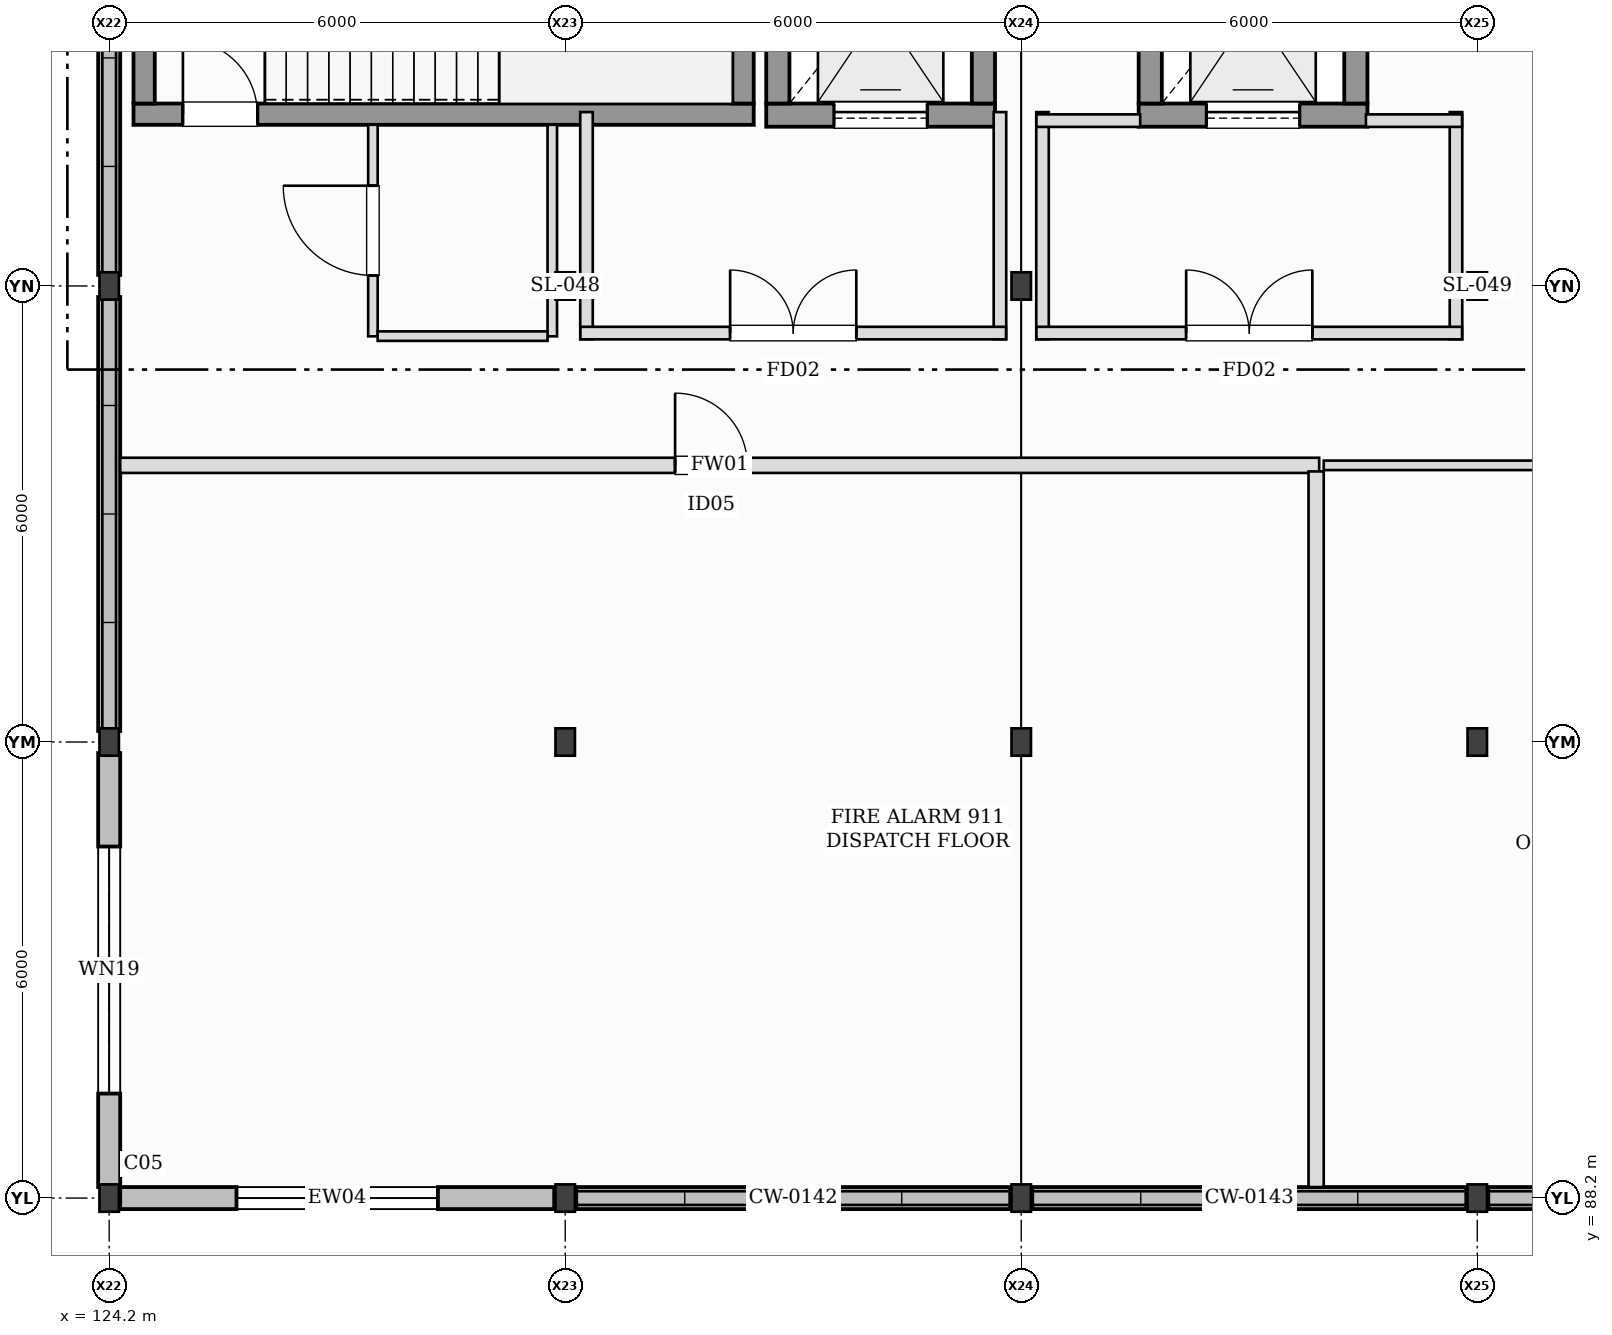
"""IFC4 building model, lengths in metres.
Left out: names, types, materials, properties, quantities, classifications, styles, units other than length and angle.
Written with IfcOpenShell. Run it as: python <this file> out.ifc"""

import sys

from ifc_helpers import new_model, si_unit, direction, frame, frame_2d, origin, origin_2d, place, context, subcontext, project, spatial, rectangle, i_section, extrude, element, fill, save


model = new_model("IFC4")
c1 = context("Model", 3, precision=1e-05, world=origin(), true_north=direction((0.0, 1.0)))
c2 = subcontext(c1, "Body", "Model", "MODEL_VIEW")
j1 = project(units=[si_unit("LENGTHUNIT", "METRE"), si_unit("PLANEANGLEUNIT", "RADIAN")], contexts=[c1])
p1 = place(None, origin())
s1 = spatial("IfcSite", under=j1, at=p1, CompositionType="ELEMENT")
p2 = place(p1, origin())
s2 = spatial("IfcBuilding", under=s1, at=p2, CompositionType="ELEMENT")
p3 = place(p2, frame((0.0, 0.0, 14.0)))
s3 = spatial("IfcBuildingStorey", under=s2, at=p3, CompositionType="ELEMENT", Elevation=14.0)
for number, where, z_axis, x_axis in (
    (1, (124.2, 88.2, 0.0), (0.0, 0.0, 1.0), (1.0, 0.0, 0.0)),
    (2, (124.2, 94.2, 0.0), (0.0, 0.0, 1.0), (1.0, 0.0, 0.0)),
    (3, (124.2, 100.2, 0.0), (0.0, 0.0, 1.0), (1.0, 0.0, 0.0)),
    (4, (130.2, 88.2, 0.0), (0.0, 0.0, 1.0), (1.0, 0.0, 0.0)),
    (5, (130.2, 94.2, 0.0), (0.0, 0.0, 1.0), (1.0, 0.0, 0.0)),
    (6, (130.2, 100.2, 0.0), (0.0, 0.0, 1.0), (1.0, 0.0, 0.0)),
    (7, (136.2, 88.2, 0.0), (0.0, 0.0, 1.0), (1.0, 0.0, 0.0)),
    (8, (136.2, 94.2, 0.0), (0.0, 0.0, 1.0), (1.0, 0.0, 0.0)),
    (9, (136.2, 100.2, 0.0), (0.0, 0.0, 1.0), (1.0, 0.0, 0.0)),
    (10, (142.2, 88.2, 0.0), (0.0, 0.0, 1.0), (1.0, 0.0, 0.0)),
    (11, (142.2, 94.2, 0.0), (0.0, 0.0, 1.0), (1.0, 0.0, 0.0)),
    (12, (142.2, 100.2, 0.0), (0.0, 0.0, 1.0), (1.0, 0.0, 0.0)),
):
    element("IfcColumn", number, at=place(p3, frame(where, z_axis=z_axis, x_axis=x_axis)), inside=s3, PredefinedType="COLUMN", context=c2, shape_type="SweptSolid", body=[
        extrude(i_section(OverallWidth=0.256, OverallDepth=0.36, WebThickness=0.011, FlangeThickness=0.02, at=origin_2d()), origin(), (0.0, 0.0, 1.0), 4.0),
    ])
p4 = place(p3, frame((124.345, 88.2, 0.0), z_axis=(0.0, 0.0, 1.0), x_axis=(1.0, 0.0, 0.0)))
e13 = element("IfcWall", 13, at=p4, inside=s3, PredefinedType="STANDARD", context=c2, shape_type="SweptSolid", body=[
    extrude(rectangle(XDim=5.71, YDim=0.29, at=frame_2d((2.855, 0.0))), origin(), (0.0, 0.0, 1.0), 3.299),
])
p5 = place(p4, frame((1.53, 0.0, 1.0)))
e14 = element("IfcOpeningElement", 14, at=p5, cuts=e13, PredefinedType="OPENING", context=c2, shape_type="SweptSolid", body=[
    extrude(rectangle(XDim=2.65, YDim=1.55, at=frame_2d((1.325, 0.775))), frame((0.0, 0.155, 0.0), z_axis=(0.0, -1.0, 0.0), x_axis=(1.0, 0.0, 0.0)), (0.0, 0.0, 1.0), 0.31),
])
p6 = place(p3, frame((130.345, 88.2, 0.0), z_axis=(0.0, 0.0, 1.0), x_axis=(1.0, 0.0, 0.0)))
e15 = element("IfcWall", 15, at=p6, inside=s3, PredefinedType="STANDARD", context=c2, shape_type="SweptSolid", body=[
    extrude(rectangle(XDim=5.71, YDim=0.29, at=frame_2d((2.855, 0.0))), origin(), (0.0, 0.0, 1.0), 0.56),
])
p7 = place(p3, frame((136.345, 88.2, 0.0), z_axis=(0.0, 0.0, 1.0), x_axis=(1.0, 0.0, 0.0)))
e16 = element("IfcWall", 16, at=p7, inside=s3, PredefinedType="STANDARD", context=c2, shape_type="SweptSolid", body=[
    extrude(rectangle(XDim=5.71, YDim=0.29, at=frame_2d((2.855, 0.0))), origin(), (0.0, 0.0, 1.0), 0.68),
])
p8 = place(p3, frame((142.345, 88.2, 0.0), z_axis=(0.0, 0.0, 1.0), x_axis=(1.0, 0.0, 0.0)))
e17 = element("IfcWall", 17, at=p8, inside=s3, PredefinedType="STANDARD", context=c2, shape_type="SweptSolid", body=[
    extrude(rectangle(XDim=5.71, YDim=0.29, at=frame_2d((2.855, 0.0))), origin(), (0.0, 0.0, 1.0), 0.8),
])
p9 = place(p3, frame((124.2, 94.055, 0.0), z_axis=(0.0, 0.0, 1.0), x_axis=(0.0, -1.0, 0.0)))
e18 = element("IfcWall", 18, at=p9, inside=s3, PredefinedType="STANDARD", context=c2, shape_type="SweptSolid", body=[
    extrude(rectangle(XDim=5.71, YDim=0.29, at=frame_2d((2.855, 0.0))), origin(), (0.0, 0.0, 1.0), 3.303),
])
p10 = place(p9, frame((1.23, 0.0, 1.0)))
e19 = element("IfcOpeningElement", 19, at=p10, cuts=e18, PredefinedType="OPENING", context=c2, shape_type="SweptSolid", body=[
    extrude(rectangle(XDim=3.25, YDim=1.55, at=frame_2d((1.625, 0.775))), frame((0.0, 0.155, 0.0), z_axis=(0.0, -1.0, 0.0), x_axis=(1.0, 0.0, 0.0)), (0.0, 0.0, 1.0), 0.31),
])
p11 = place(p3, frame((124.2, 100.055, 0.0), z_axis=(0.0, 0.0, 1.0), x_axis=(0.0, -1.0, 0.0)))
e20 = element("IfcWall", 20, at=p11, inside=s3, PredefinedType="STANDARD", context=c2, shape_type="SweptSolid", body=[
    extrude(rectangle(XDim=5.71, YDim=0.29, at=frame_2d((2.855, 0.0))), origin(), (0.0, 0.0, 1.0), 0.8),
])
p12 = place(p3, frame((124.2, 106.055, 0.0), z_axis=(0.0, 0.0, 1.0), x_axis=(0.0, -1.0, 0.0)))
e21 = element("IfcWall", 21, at=p12, inside=s3, PredefinedType="STANDARD", context=c2, shape_type="SweptSolid", body=[
    extrude(rectangle(XDim=5.71, YDim=0.29, at=frame_2d((2.855, 0.0))), origin(), (0.0, 0.0, 1.0), 0.92),
])
p13 = place(p3, frame((124.52, 102.46, 0.0), z_axis=(0.0, 0.0, 1.0), x_axis=(1.0, 0.0, 0.0)))
e22 = element("IfcWall", 22, at=p13, inside=s3, PredefinedType="SHEAR", context=c2, shape_type="SweptSolid", body=[
    extrude(rectangle(XDim=8.16, YDim=0.28, at=frame_2d((4.08, 0.0))), origin(), (0.0, 0.0, 1.0), 4.0),
])
p14 = place(p13, frame((0.65, 0.0, 0.0)))
e23 = element("IfcOpeningElement", 23, at=p14, cuts=e22, PredefinedType="OPENING", context=c2, shape_type="SweptSolid", body=[
    extrude(rectangle(XDim=0.98, YDim=2.15, at=frame_2d((0.49, 1.075))), frame((0.0, 0.15, 0.0), z_axis=(0.0, -1.0, 0.0), x_axis=(1.0, 0.0, 0.0)), (0.0, 0.0, 1.0), 0.3),
])
for number, where, z_axis, x_axis in (
    (24, (124.66, 105.6, 0.0), (0.0, 0.0, 1.0), (0.0, -1.0, 0.0)),
    (25, (132.54, 102.6, 0.0), (0.0, 0.0, 1.0), (0.0, 1.0, 0.0)),
):
    element("IfcWall", number, at=place(p3, frame(where, z_axis=z_axis, x_axis=x_axis)), inside=s3, PredefinedType="SHEAR", context=c2, shape_type="SweptSolid", body=[
        extrude(rectangle(XDim=3.0, YDim=0.28, at=frame_2d((1.5, 0.0))), origin(), (0.0, 0.0, 1.0), 4.0),
    ])
p15 = place(p3, frame((132.845, 102.448, 0.0), z_axis=(0.0, 0.0, 1.0), x_axis=(1.0, 0.0, 0.0)))
e26 = element("IfcWall", 26, at=p15, inside=s3, PredefinedType="SHEAR", context=c2, shape_type="SweptSolid", body=[
    extrude(rectangle(XDim=3.01, YDim=0.305, at=frame_2d((1.505, 0.0))), origin(), (0.0, 0.0, 1.0), 4.0),
])
p16 = place(p15, frame((0.895, 0.0, 0.0)))
e27 = element("IfcOpeningElement", 27, at=p16, cuts=e26, PredefinedType="OPENING", context=c2, shape_type="SweptSolid", body=[
    extrude(rectangle(XDim=1.22, YDim=2.22, at=frame_2d((0.61, 1.11))), frame((0.0, 0.162, 0.0), z_axis=(0.0, -1.0, 0.0), x_axis=(1.0, 0.0, 0.0)), (0.0, 0.0, 1.0), 0.325),
])
for number, where, z_axis, x_axis in (
    (28, (132.998, 105.6, 0.0), (0.0, 0.0, 1.0), (0.0, -1.0, 0.0)),
    (29, (135.702, 102.6, 0.0), (0.0, 0.0, 1.0), (0.0, 1.0, 0.0)),
):
    element("IfcWall", number, at=place(p3, frame(where, z_axis=z_axis, x_axis=x_axis)), inside=s3, PredefinedType="SHEAR", context=c2, shape_type="SweptSolid", body=[
        extrude(rectangle(XDim=3.0, YDim=0.305, at=frame_2d((1.5, 0.0))), origin(), (0.0, 0.0, 1.0), 4.0),
    ])
for number, where, z_axis, x_axis in (
    (30, (130.48, 99.5, 0.0), (0.0, 0.0, 1.0), (0.0, 1.0, 0.0)),
    (31, (135.92, 102.488, 0.0), (0.0, 0.0, 1.0), (0.0, -1.0, 0.0)),
):
    element("IfcWall", number, at=place(p3, frame(where, z_axis=z_axis, x_axis=x_axis)), inside=s3, PredefinedType="PARTITIONING", context=c2, shape_type="SweptSolid", body=[
        extrude(rectangle(XDim=2.988, YDim=0.165, at=frame_2d((1.494, 0.0))), origin(), (0.0, 0.0, 1.0), 3.273),
    ])
p17 = place(p3, frame((130.4, 99.58, 0.0), z_axis=(0.0, 0.0, 1.0), x_axis=(1.0, 0.0, 0.0)))
e32 = element("IfcWall", 32, at=p17, inside=s3, PredefinedType="PARTITIONING", context=c2, shape_type="SweptSolid", body=[
    extrude(rectangle(XDim=5.6, YDim=0.165, at=frame_2d((2.8, 0.0))), origin(), (0.0, 0.0, 1.0), 3.76),
])
p18 = place(p17, frame((1.97, 0.0, 0.0)))
e33 = element("IfcOpeningElement", 33, at=p18, cuts=e32, PredefinedType="OPENING", context=c2, shape_type="SweptSolid", body=[
    extrude(rectangle(XDim=1.66, YDim=2.2, at=frame_2d((0.83, 1.1))), frame((0.0, 0.093, 0.0), z_axis=(0.0, -1.0, 0.0), x_axis=(1.0, 0.0, 0.0)), (0.0, 0.0, 1.0), 0.185),
])
p19 = place(p3, frame((137.745, 102.448, 0.0), z_axis=(0.0, 0.0, 1.0), x_axis=(1.0, 0.0, 0.0)))
e34 = element("IfcWall", 34, at=p19, inside=s3, PredefinedType="SHEAR", context=c2, shape_type="SweptSolid", body=[
    extrude(rectangle(XDim=3.01, YDim=0.305, at=frame_2d((1.505, 0.0))), origin(), (0.0, 0.0, 1.0), 4.0),
])
p20 = place(p19, frame((0.895, 0.0, 0.0)))
e35 = element("IfcOpeningElement", 35, at=p20, cuts=e34, PredefinedType="OPENING", context=c2, shape_type="SweptSolid", body=[
    extrude(rectangle(XDim=1.22, YDim=2.22, at=frame_2d((0.61, 1.11))), frame((0.0, 0.162, 0.0), z_axis=(0.0, -1.0, 0.0), x_axis=(1.0, 0.0, 0.0)), (0.0, 0.0, 1.0), 0.325),
])
for number, where, z_axis, x_axis in (
    (36, (137.897, 105.6, 0.0), (0.0, 0.0, 1.0), (0.0, -1.0, 0.0)),
    (37, (140.603, 102.6, 0.0), (0.0, 0.0, 1.0), (0.0, 1.0, 0.0)),
):
    element("IfcWall", number, at=place(p3, frame(where, z_axis=z_axis, x_axis=x_axis)), inside=s3, PredefinedType="SHEAR", context=c2, shape_type="SweptSolid", body=[
        extrude(rectangle(XDim=3.0, YDim=0.305, at=frame_2d((1.5, 0.0))), origin(), (0.0, 0.0, 1.0), 4.0),
    ])
for number, where, z_axis, x_axis in (
    (38, (136.48, 99.5, 0.0), (0.0, 0.0, 1.0), (0.0, 1.0, 0.0)),
    (39, (141.92, 102.488, 0.0), (0.0, 0.0, 1.0), (0.0, -1.0, 0.0)),
):
    element("IfcWall", number, at=place(p3, frame(where, z_axis=z_axis, x_axis=x_axis)), inside=s3, PredefinedType="PARTITIONING", context=c2, shape_type="SweptSolid", body=[
        extrude(rectangle(XDim=2.988, YDim=0.165, at=frame_2d((1.494, 0.0))), origin(), (0.0, 0.0, 1.0), 3.273),
    ])
p21 = place(p3, frame((136.4, 102.375, 0.0), z_axis=(0.0, 0.0, 1.0), x_axis=(1.0, 0.0, 0.0)))
e40 = element("IfcWall", 40, at=p21, inside=s3, PredefinedType="PARTITIONING", context=c2, shape_type="SweptSolid", body=[
    extrude(rectangle(XDim=1.365, YDim=0.165, at=frame_2d((0.683, 0.0))), origin(), (0.0, 0.0, 1.0), 3.76),
])
p22 = place(p3, frame((140.735, 102.375, 0.0), z_axis=(0.0, 0.0, 1.0), x_axis=(1.0, 0.0, 0.0)))
e41 = element("IfcWall", 41, at=p22, inside=s3, PredefinedType="PARTITIONING", context=c2, shape_type="SweptSolid", body=[
    extrude(rectangle(XDim=1.265, YDim=0.165, at=frame_2d((0.632, 0.0))), origin(), (0.0, 0.0, 1.0), 3.76),
])
p23 = place(p3, frame((136.4, 99.58, 0.0), z_axis=(0.0, 0.0, 1.0), x_axis=(1.0, 0.0, 0.0)))
e42 = element("IfcWall", 42, at=p23, inside=s3, PredefinedType="PARTITIONING", context=c2, shape_type="SweptSolid", body=[
    extrude(rectangle(XDim=5.6, YDim=0.165, at=frame_2d((2.8, 0.0))), origin(), (0.0, 0.0, 1.0), 3.76),
])
p24 = place(p23, frame((1.97, 0.0, 0.0)))
e43 = element("IfcOpeningElement", 43, at=p24, cuts=e42, PredefinedType="OPENING", context=c2, shape_type="SweptSolid", body=[
    extrude(rectangle(XDim=1.66, YDim=2.2, at=frame_2d((0.83, 1.1))), frame((0.0, 0.093, 0.0), z_axis=(0.0, -1.0, 0.0), x_axis=(1.0, 0.0, 0.0)), (0.0, 0.0, 1.0), 0.185),
])
p25 = place(p3, frame((124.345, 97.84, 0.0), z_axis=(0.0, 0.0, 1.0), x_axis=(1.0, 0.0, 0.0)))
e44 = element("IfcWall", 44, at=p25, inside=s3, PredefinedType="PARTITIONING", context=c2, shape_type="SweptSolid", body=[
    extrude(rectangle(XDim=15.775, YDim=0.2, at=frame_2d((7.888, 0.0))), origin(), (0.0, 0.0, 1.0), 3.76),
])
p26 = place(p25, frame((7.301, 0.0, 0.0)))
e45 = element("IfcOpeningElement", 45, at=p26, cuts=e44, PredefinedType="OPENING", context=c2, shape_type="SweptSolid", body=[
    extrude(rectangle(XDim=0.95, YDim=2.12, at=frame_2d((0.475, 1.06))), frame((0.0, 0.11, 0.0), z_axis=(0.0, -1.0, 0.0), x_axis=(1.0, 0.0, 0.0)), (0.0, 0.0, 1.0), 0.22),
])
p27 = place(p3, frame((140.08, 97.76, 0.0), z_axis=(0.0, 0.0, 1.0), x_axis=(0.0, -1.0, 0.0)))
e46 = element("IfcWall", 46, at=p27, inside=s3, PredefinedType="PARTITIONING", context=c2, shape_type="SweptSolid", body=[
    extrude(rectangle(XDim=9.415, YDim=0.2, at=frame_2d((4.708, 0.0))), origin(), (0.0, 0.0, 1.0), 3.531),
])
p28 = place(p3, frame((140.18, 97.84, 0.0), z_axis=(0.0, 0.0, 1.0), x_axis=(1.0, 0.0, 0.0)))
e47 = element("IfcWall", 47, at=p28, inside=s3, PredefinedType="PARTITIONING", context=c2, shape_type="SweptSolid", body=[
    extrude(rectangle(XDim=7.703, YDim=0.125, at=frame_2d((3.851, 0.0))), origin(), (0.0, 0.0, 1.0), 3.76),
])
p29 = place(p28, frame((3.336, 0.0, 0.0)))
e48 = element("IfcOpeningElement", 48, at=p29, cuts=e47, PredefinedType="OPENING", context=c2, shape_type="SweptSolid", body=[
    extrude(rectangle(XDim=1.03, YDim=2.15, at=frame_2d((0.515, 1.075))), frame((0.0, 0.073, 0.0), z_axis=(0.0, -1.0, 0.0), x_axis=(1.0, 0.0, 0.0)), (0.0, 0.0, 1.0), 0.145),
])
p30 = place(p3, frame((127.67, 99.538, 0.0), z_axis=(0.0, 0.0, 1.0), x_axis=(0.0, 1.0, 0.0)))
e49 = element("IfcWall", 49, at=p30, inside=s3, PredefinedType="PARTITIONING", context=c2, shape_type="SweptSolid", body=[
    extrude(rectangle(XDim=2.782, YDim=0.125, at=frame_2d((1.391, 0.0))), origin(), (0.0, 0.0, 1.0), 3.76),
])
p31 = place(p30, frame((0.801, 0.0, 0.0)))
e50 = element("IfcOpeningElement", 50, at=p31, cuts=e49, PredefinedType="OPENING", context=c2, shape_type="SweptSolid", body=[
    extrude(rectangle(XDim=1.18, YDim=2.16, at=frame_2d((0.59, 1.08))), frame((0.0, 0.073, 0.0), z_axis=(0.0, -1.0, 0.0), x_axis=(1.0, 0.0, 0.0)), (0.0, 0.0, 1.0), 0.145),
])
p32 = place(p3, frame((130.03, 102.32, 0.0), z_axis=(0.0, 0.0, 1.0), x_axis=(0.0, -1.0, 0.0)))
e51 = element("IfcWall", 51, at=p32, inside=s3, PredefinedType="PARTITIONING", context=c2, shape_type="SweptSolid", body=[
    extrude(rectangle(XDim=2.782, YDim=0.125, at=frame_2d((1.391, 0.0))), origin(), (0.0, 0.0, 1.0), 3.273),
])
p33 = place(p3, frame((129.968, 99.54, 0.0), z_axis=(0.0, 0.0, 1.0), x_axis=(-1.0, 0.0, 0.0)))
e52 = element("IfcWall", 52, at=p33, inside=s3, PredefinedType="PARTITIONING", context=c2, shape_type="SweptSolid", body=[
    extrude(rectangle(XDim=2.235, YDim=0.125, at=frame_2d((1.118, 0.0))), origin(), (0.0, 0.0, 1.0), 3.76),
])
p34 = place(p5, origin())
e53 = element("IfcWindow", 53, at=p34, inside=s3, PartitioningType="SINGLE_PANEL", PredefinedType="WINDOW", context=c2, shape_type="SweptSolid", body=[
    extrude(rectangle(XDim=2.65, YDim=1.55, at=frame_2d((1.325, 0.775))), frame((0.0, 0.03, 0.0), z_axis=(0.0, -1.0, 0.0), x_axis=(1.0, 0.0, 0.0)), (0.0, 0.0, 1.0), 0.06),
])
fill(e14, e53)
p35 = place(p10, origin())
e54 = element("IfcWindow", 54, at=p35, inside=s3, PartitioningType="SINGLE_PANEL", PredefinedType="WINDOW", context=c2, shape_type="SweptSolid", body=[
    extrude(rectangle(XDim=3.25, YDim=1.55, at=frame_2d((1.625, 0.775))), frame((0.0, 0.03, 0.0), z_axis=(0.0, -1.0, 0.0), x_axis=(1.0, 0.0, 0.0)), (0.0, 0.0, 1.0), 0.06),
])
fill(e19, e54)
p36 = place(p14, origin())
e55 = element("IfcDoor", 55, at=p36, inside=s3, OperationType="SINGLE_SWING_LEFT", PredefinedType="DOOR", context=c2, shape_type="SweptSolid", body=[
    extrude(rectangle(XDim=0.98, YDim=2.15, at=frame_2d((0.49, 1.075))), frame((0.0, 0.025, 0.0), z_axis=(0.0, -1.0, 0.0), x_axis=(1.0, 0.0, 0.0)), (0.0, 0.0, 1.0), 0.05),
])
fill(e23, e55)
p37 = place(p16, origin())
e56 = element("IfcDoor", 56, at=p37, inside=s3, OperationType="SLIDING_TO_LEFT", PredefinedType="DOOR", context=c2, shape_type="SweptSolid", body=[
    extrude(rectangle(XDim=1.22, YDim=2.22, at=frame_2d((0.61, 1.11))), frame((0.0, 0.025, 0.0), z_axis=(0.0, -1.0, 0.0), x_axis=(1.0, 0.0, 0.0)), (0.0, 0.0, 1.0), 0.05),
])
fill(e27, e56)
p38 = place(p18, frame((1.66, 0.0, 0.0), z_axis=(0.0, 0.0, 1.0), x_axis=(-1.0, 0.0, 0.0)))
e57 = element("IfcDoor", 57, at=p38, inside=s3, OperationType="DOUBLE_DOOR_SINGLE_SWING", PredefinedType="DOOR", context=c2, shape_type="SweptSolid", body=[
    extrude(rectangle(XDim=1.66, YDim=2.2, at=frame_2d((0.83, 1.1))), frame((0.0, 0.025, 0.0), z_axis=(0.0, -1.0, 0.0), x_axis=(1.0, 0.0, 0.0)), (0.0, 0.0, 1.0), 0.05),
])
fill(e33, e57)
p39 = place(p20, origin())
e58 = element("IfcDoor", 58, at=p39, inside=s3, OperationType="SLIDING_TO_LEFT", PredefinedType="DOOR", context=c2, shape_type="SweptSolid", body=[
    extrude(rectangle(XDim=1.22, YDim=2.22, at=frame_2d((0.61, 1.11))), frame((0.0, 0.025, 0.0), z_axis=(0.0, -1.0, 0.0), x_axis=(1.0, 0.0, 0.0)), (0.0, 0.0, 1.0), 0.05),
])
fill(e35, e58)
p40 = place(p24, frame((1.66, 0.0, 0.0), z_axis=(0.0, 0.0, 1.0), x_axis=(-1.0, 0.0, 0.0)))
e59 = element("IfcDoor", 59, at=p40, inside=s3, OperationType="DOUBLE_DOOR_SINGLE_SWING", PredefinedType="DOOR", context=c2, shape_type="SweptSolid", body=[
    extrude(rectangle(XDim=1.66, YDim=2.2, at=frame_2d((0.83, 1.1))), frame((0.0, 0.025, 0.0), z_axis=(0.0, -1.0, 0.0), x_axis=(1.0, 0.0, 0.0)), (0.0, 0.0, 1.0), 0.05),
])
fill(e43, e59)
p41 = place(p26, frame((0.95, 0.0, 0.0), z_axis=(0.0, 0.0, 1.0), x_axis=(-1.0, 0.0, 0.0)))
e60 = element("IfcDoor", 60, at=p41, inside=s3, OperationType="SINGLE_SWING_LEFT", PredefinedType="DOOR", context=c2, shape_type="SweptSolid", body=[
    extrude(rectangle(XDim=0.95, YDim=2.12, at=frame_2d((0.475, 1.06))), frame((0.0, 0.025, 0.0), z_axis=(0.0, -1.0, 0.0), x_axis=(1.0, 0.0, 0.0)), (0.0, 0.0, 1.0), 0.05),
])
fill(e45, e60)
p42 = place(p31, frame((1.18, 0.0, 0.0), z_axis=(0.0, 0.0, 1.0), x_axis=(-1.0, 0.0, 0.0)))
e61 = element("IfcDoor", 61, at=p42, inside=s3, OperationType="SINGLE_SWING_RIGHT", PredefinedType="DOOR", context=c2, shape_type="SweptSolid", body=[
    extrude(rectangle(XDim=1.18, YDim=2.16, at=frame_2d((0.59, 1.08))), frame((0.0, 0.025, 0.0), z_axis=(0.0, -1.0, 0.0), x_axis=(1.0, 0.0, 0.0)), (0.0, 0.0, 1.0), 0.05),
])
fill(e50, e61)
save(model, sys.argv[1])
